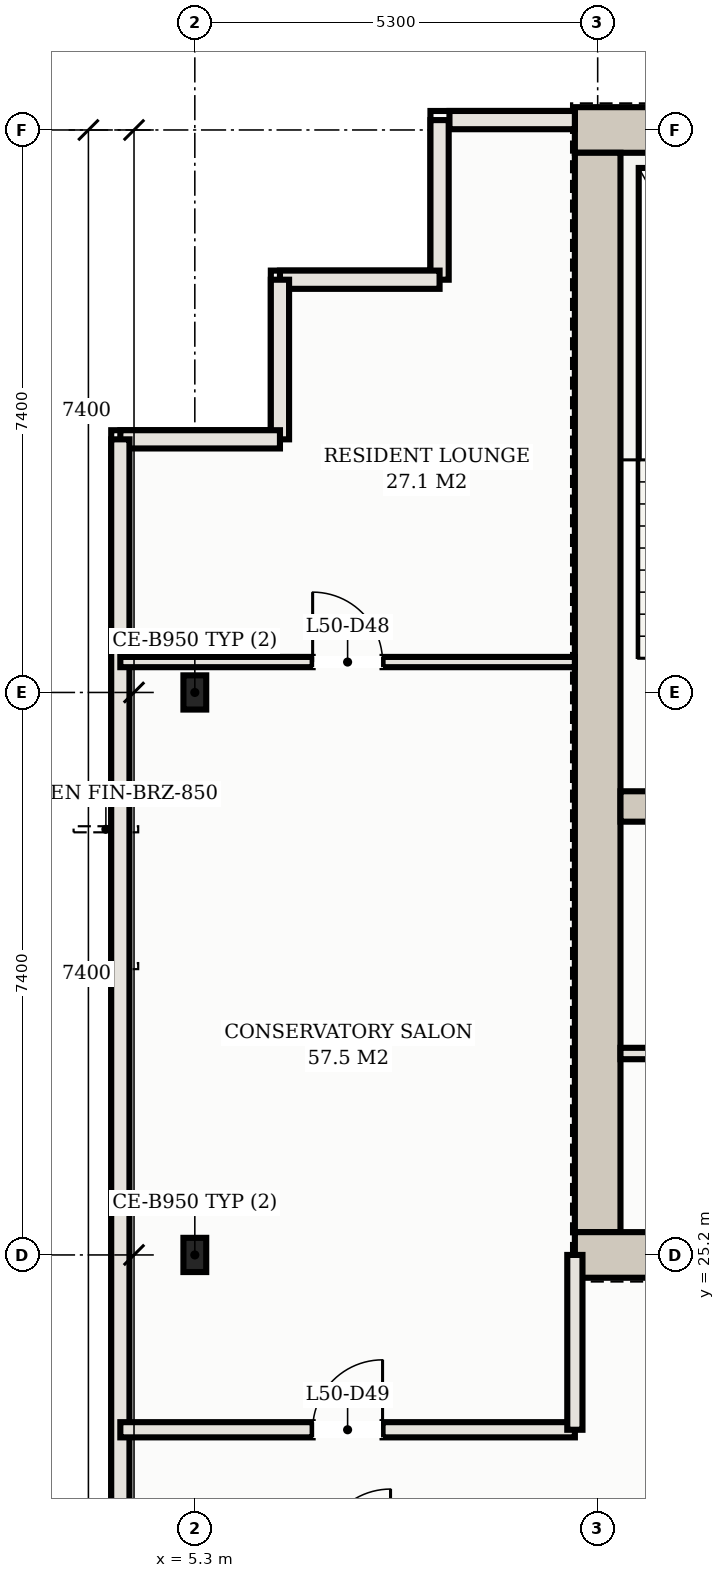
"""IFC4 building model, lengths in metres.
Left out: names, types, materials, properties, quantities, classifications, styles, units other than length and angle.
Written with IfcOpenShell. Run it as: python <this file> out.ifc"""

import sys

from ifc_helpers import new_model, si_unit, direction, frame, frame_2d, origin, origin_2d, place, context, subcontext, project, spatial, rectangle, hollow_rectangle, extrude, element, fill, save


model = new_model("IFC4")
c1 = context("Model", 3, precision=1e-05, world=origin(), true_north=direction((0.0, 1.0)))
c2 = subcontext(c1, "Body", "Model", "MODEL_VIEW")
j1 = project(units=[si_unit("LENGTHUNIT", "METRE"), si_unit("PLANEANGLEUNIT", "RADIAN")], contexts=[c1])
p1 = place(None, origin())
s1 = spatial("IfcSite", under=j1, at=p1, CompositionType="ELEMENT")
p2 = place(p1, origin())
s2 = spatial("IfcBuilding", under=s1, at=p2, CompositionType="ELEMENT")
p3 = place(p2, frame((0.0, 0.0, 182.1)))
s3 = spatial("IfcBuildingStorey", under=s2, at=p3, CompositionType="ELEMENT", Elevation=182.1)
p4 = place(p3, frame((10.3, 40.0, 0.0), z_axis=(0.0, 0.0, 1.0), x_axis=(1.0, 0.0, 0.0)))
e1 = element("IfcWall", 1, at=p4, inside=s3, PredefinedType="SHEAR", context=c2, shape_type="SweptSolid", body=[
    extrude(rectangle(XDim=32.4, YDim=0.6, at=frame_2d((16.2, 0.0))), origin(), (0.0, 0.0, 1.0), 3.03),
])
p5 = place(p3, frame((10.6, 25.5, 0.0), z_axis=(0.0, 0.0, 1.0), x_axis=(0.0, 1.0, 0.0)))
e2 = element("IfcWall", 2, at=p5, inside=s3, PredefinedType="SHEAR", context=c2, shape_type="SweptSolid", body=[
    extrude(rectangle(XDim=14.2, YDim=0.6, at=frame_2d((7.1, 0.0))), origin(), (0.0, 0.0, 1.0), 3.03),
])
p6 = place(p3, frame((10.3, 25.2, 0.0), z_axis=(0.0, 0.0, 1.0), x_axis=(1.0, 0.0, 0.0)))
e3 = element("IfcWall", 3, at=p6, inside=s3, PredefinedType="SHEAR", context=c2, shape_type="SweptSolid", body=[
    extrude(rectangle(XDim=8.1, YDim=0.6, at=frame_2d((4.05, 0.0))), origin(), (0.0, 0.0, 1.0), 3.03),
])
p7 = place(p6, frame((6.2, 0.0, 0.0)))
e4 = element("IfcOpeningElement", 4, at=p7, cuts=e3, PredefinedType="OPENING", context=c2, shape_type="SweptSolid", body=[
    extrude(rectangle(XDim=1.25, YDim=2.2, at=frame_2d((0.625, 1.1))), frame((0.0, 0.31, 0.0), z_axis=(0.0, -1.0, 0.0), x_axis=(1.0, 0.0, 0.0)), (0.0, 0.0, 1.0), 0.62),
])
p8 = place(p3, frame((10.9, 31.1, 0.0), z_axis=(0.0, 0.0, 1.0), x_axis=(1.0, 0.0, 0.0)))
e5 = element("IfcWall", 5, at=p8, inside=s3, PredefinedType="SHEAR", context=c2, shape_type="SweptSolid", body=[
    extrude(rectangle(XDim=4.0, YDim=0.4, at=frame_2d((2.0, 0.0))), origin(), (0.0, 0.0, 1.0), 3.03),
])
for number, where, z_axis, x_axis in (
    (6, (5.3, 25.2, 0.0), (0.0, 0.0, 1.0), (1.0, 0.0, 0.0)),
    (7, (5.3, 32.6, 0.0), (0.0, 0.0, 1.0), (1.0, 0.0, 0.0)),
):
    element("IfcColumn", number, at=place(p3, frame(where, z_axis=z_axis, x_axis=x_axis)), inside=s3, PredefinedType="COLUMN", context=c2, shape_type="SweptSolid", body=[
        extrude(hollow_rectangle(XDim=0.3, YDim=0.45, WallThickness=0.016, at=origin_2d()), origin(), (0.0, 0.0, 1.0), 3.3),
    ])
p9 = place(p3, frame((10.3, 40.13, 0.0), z_axis=(0.0, 0.0, 1.0), x_axis=(-1.0, 0.0, 0.0)))
e8 = element("IfcWall", 8, at=p9, inside=s3, PredefinedType="SOLIDWALL", context=c2, shape_type="SweptSolid", body=[
    extrude(rectangle(XDim=1.65, YDim=0.24, at=frame_2d((0.825, 0.0))), origin(), (0.0, 0.0, 1.0), 3.03),
])
p10 = place(p3, frame((8.52, 40.13, 0.0), z_axis=(0.0, 0.0, 1.0), x_axis=(0.0, -1.0, 0.0)))
e9 = element("IfcWall", 9, at=p10, inside=s3, PredefinedType="SOLIDWALL", context=c2, shape_type="SweptSolid", body=[
    extrude(rectangle(XDim=2.1, YDim=0.24, at=frame_2d((1.05, 0.0))), origin(), (0.0, 0.0, 1.0), 3.03),
])
for number, where, z_axis, x_axis in (
    (10, (8.52, 38.03, 0.0), (0.0, 0.0, 1.0), (-1.0, 0.0, 0.0)),
    (11, (6.42, 38.03, 0.0), (0.0, 0.0, 1.0), (0.0, -1.0, 0.0)),
):
    element("IfcWall", number, at=place(p3, frame(where, z_axis=z_axis, x_axis=x_axis)), inside=s3, PredefinedType="SOLIDWALL", context=c2, shape_type="SweptSolid", body=[
        extrude(rectangle(XDim=2.1, YDim=0.24, at=frame_2d((1.05, 0.0))), origin(), (0.0, 0.0, 1.0), 3.03),
    ])
p11 = place(p3, frame((6.42, 35.93, 0.0), z_axis=(0.0, 0.0, 1.0), x_axis=(-1.0, 0.0, 0.0)))
e12 = element("IfcWall", 12, at=p11, inside=s3, PredefinedType="SOLIDWALL", context=c2, shape_type="SweptSolid", body=[
    extrude(rectangle(XDim=2.1, YDim=0.24, at=frame_2d((1.05, 0.0))), origin(), (0.0, 0.0, 1.0), 3.03),
])
p12 = place(p3, frame((4.32, 35.93, 0.0), z_axis=(0.0, 0.0, 1.0), x_axis=(0.0, -1.0, 0.0)))
e13 = element("IfcWall", 13, at=p12, inside=s3, PredefinedType="SOLIDWALL", context=c2, shape_type="SweptSolid", body=[
    extrude(rectangle(XDim=27.41, YDim=0.24, at=frame_2d((13.705, 0.0))), origin(), (0.0, 0.0, 1.0), 3.03),
])
p13 = place(p3, frame((10.9, 27.85, 0.0), z_axis=(0.0, 0.0, 1.0), x_axis=(1.0, 0.0, 0.0)))
e14 = element("IfcWall", 14, at=p13, inside=s3, PredefinedType="PARTITIONING", context=c2, shape_type="SweptSolid", body=[
    extrude(rectangle(XDim=4.95, YDim=0.15, at=frame_2d((2.475, 0.0))), origin(), (0.0, 0.0, 1.0), 2.57),
])
p14 = place(p3, frame((4.32, 22.9, 0.0), z_axis=(0.0, 0.0, 1.0), x_axis=(1.0, 0.0, 0.0)))
e15 = element("IfcWall", 15, at=p14, inside=s3, PredefinedType="PARTITIONING", context=c2, shape_type="SweptSolid", body=[
    extrude(rectangle(XDim=5.98, YDim=0.2, at=frame_2d((2.99, 0.0))), origin(), (0.0, 0.0, 1.0), 2.57),
])
p15 = place(p14, frame((2.53, 0.0, 0.0)))
e16 = element("IfcOpeningElement", 16, at=p15, cuts=e15, PredefinedType="OPENING", context=c2, shape_type="SweptSolid", body=[
    extrude(rectangle(XDim=0.92, YDim=2.15, at=frame_2d((0.46, 1.075))), frame((0.0, 0.11, 0.0), z_axis=(0.0, -1.0, 0.0), x_axis=(1.0, 0.0, 0.0)), (0.0, 0.0, 1.0), 0.22),
])
p16 = place(p3, frame((10.3, 22.9, 0.0), z_axis=(0.0, 0.0, 1.0), x_axis=(0.0, 1.0, 0.0)))
e17 = element("IfcWall", 17, at=p16, inside=s3, PredefinedType="PARTITIONING", context=c2, shape_type="SweptSolid", body=[
    extrude(rectangle(XDim=2.3, YDim=0.2, at=frame_2d((1.15, 0.0))), origin(), (0.0, 0.0, 1.0), 2.325),
])
p17 = place(p3, frame((4.32, 33.0, 0.0), z_axis=(0.0, 0.0, 1.0), x_axis=(1.0, 0.0, 0.0)))
e18 = element("IfcWall", 18, at=p17, inside=s3, PredefinedType="PARTITIONING", context=c2, shape_type="SweptSolid", body=[
    extrude(rectangle(XDim=5.98, YDim=0.135, at=frame_2d((2.99, 0.0))), origin(), (0.0, 0.0, 1.0), 2.57),
])
p18 = place(p17, frame((2.53, 0.0, 0.0)))
e19 = element("IfcOpeningElement", 19, at=p18, cuts=e18, PredefinedType="OPENING", context=c2, shape_type="SweptSolid", body=[
    extrude(rectangle(XDim=0.92, YDim=2.15, at=frame_2d((0.46, 1.075))), frame((0.0, 0.078, 0.0), z_axis=(0.0, -1.0, 0.0), x_axis=(1.0, 0.0, 0.0)), (0.0, 0.0, 1.0), 0.155),
])
p19 = place(p18, origin())
e20 = element("IfcDoor", 20, at=p19, inside=s3, OperationType="SINGLE_SWING_LEFT", PredefinedType="DOOR", context=c2, shape_type="SweptSolid", body=[
    extrude(rectangle(XDim=0.92, YDim=2.15, at=frame_2d((0.46, 1.075))), frame((0.0, 0.025, 0.0), z_axis=(0.0, -1.0, 0.0), x_axis=(1.0, 0.0, 0.0)), (0.0, 0.0, 1.0), 0.05),
])
fill(e19, e20)
p20 = place(p15, origin())
e21 = element("IfcDoor", 21, at=p20, inside=s3, OperationType="SINGLE_SWING_RIGHT", PredefinedType="DOOR", context=c2, shape_type="SweptSolid", body=[
    extrude(rectangle(XDim=0.92, YDim=2.15, at=frame_2d((0.46, 1.075))), frame((0.0, 0.025, 0.0), z_axis=(0.0, -1.0, 0.0), x_axis=(1.0, 0.0, 0.0)), (0.0, 0.0, 1.0), 0.05),
])
fill(e16, e21)
save(model, sys.argv[1])
